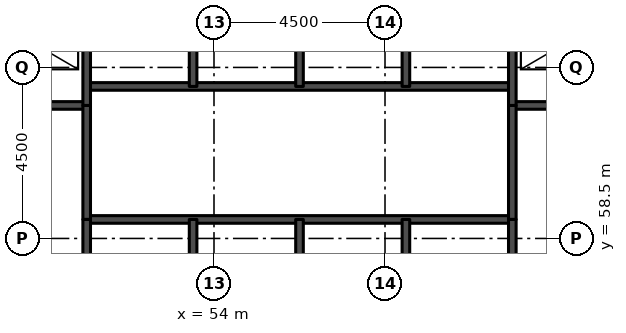
"""IFC4 building model, lengths in metres.
Left out: names, types, materials, properties, quantities, classifications, styles, units other than length and angle.
Written with IfcOpenShell. Run it as: python <this file> out.ifc"""

import sys

from ifc_helpers import new_model, si_unit, direction, frame, frame_2d, origin, place, context, subcontext, project, spatial, rectangle, extrude, element, save


model = new_model("IFC4")
c1 = context("Model", 3, precision=1e-05, world=origin(), true_north=direction((0.0, 1.0)))
c2 = subcontext(c1, "Body", "Model", "MODEL_VIEW")
j1 = project(units=[si_unit("LENGTHUNIT", "METRE"), si_unit("PLANEANGLEUNIT", "RADIAN")], contexts=[c1])
p1 = place(None, origin())
s1 = spatial("IfcSite", under=j1, at=p1, CompositionType="ELEMENT")
p2 = place(p1, origin())
s2 = spatial("IfcBuilding", under=s1, at=p2, CompositionType="ELEMENT")
p3 = place(p2, frame((0.0, 0.0, 33.0)))
s3 = spatial("IfcBuildingStorey", under=s2, at=p3, CompositionType="ELEMENT", Elevation=33.0)
p4 = place(p3, frame((50.65, 59.0, 0.0), z_axis=(0.0, 0.0, 1.0), x_axis=(1.0, 0.0, 0.0)))
e1 = element("IfcWall", 1, at=p4, inside=s3, PredefinedType="SOLIDWALL", context=c2, shape_type="SweptSolid", body=[
    extrude(rectangle(XDim=11.2, YDim=0.2, at=frame_2d((5.6, 0.0))), origin(), (0.0, 0.0, 1.0), 3.3),
])
for number, where, z_axis, x_axis in (
    (2, (45.5, 62.0, 0.0), (0.0, 0.0, 1.0), (1.0, 0.0, 0.0)),
    (3, (61.85, 62.0, 0.0), (0.0, 0.0, 1.0), (1.0, 0.0, 0.0)),
):
    element("IfcWall", number, at=place(p3, frame(where, z_axis=z_axis, x_axis=x_axis)), inside=s3, PredefinedType="SOLIDWALL", context=c2, shape_type="SweptSolid", body=[
        extrude(rectangle(XDim=5.15, YDim=0.2, at=frame_2d((2.575, 0.0))), origin(), (0.0, 0.0, 1.0), 3.08),
    ])
p5 = place(p3, frame((50.65, 62.5, 0.0), z_axis=(0.0, 0.0, 1.0), x_axis=(1.0, 0.0, 0.0)))
e4 = element("IfcWall", 4, at=p5, inside=s3, PredefinedType="SOLIDWALL", context=c2, shape_type="SweptSolid", body=[
    extrude(rectangle(XDim=11.2, YDim=0.2, at=frame_2d((5.6, 0.0))), origin(), (0.0, 0.0, 1.0), 3.3),
])
p6 = place(p3, frame((50.65, 59.0, 0.0), z_axis=(0.0, 0.0, 1.0), x_axis=(0.0, 1.0, 0.0)))
e5 = element("IfcWall", 5, at=p6, inside=s3, PredefinedType="SOLIDWALL", context=c2, shape_type="SweptSolid", body=[
    extrude(rectangle(XDim=3.0, YDim=0.2, at=frame_2d((1.5, 0.0))), origin(), (0.0, 0.0, 1.0), 3.3),
])
p7 = place(p3, frame((50.65, 56.2, 0.0), z_axis=(0.0, 0.0, 1.0), x_axis=(0.0, 1.0, 0.0)))
e6 = element("IfcWall", 6, at=p7, inside=s3, PredefinedType="SOLIDWALL", context=c2, shape_type="SweptSolid", body=[
    extrude(rectangle(XDim=2.8, YDim=0.2, at=frame_2d((1.4, 0.0))), origin(), (0.0, 0.0, 1.0), 3.08),
])
p8 = place(p3, frame((50.65, 62.0, 0.0), z_axis=(0.0, 0.0, 1.0), x_axis=(0.0, 1.0, 0.0)))
e7 = element("IfcWall", 7, at=p8, inside=s3, PredefinedType="SOLIDWALL", context=c2, shape_type="SweptSolid", body=[
    extrude(rectangle(XDim=3.3, YDim=0.2, at=frame_2d((1.65, 0.0))), origin(), (0.0, 0.0, 1.0), 3.08),
])
for number, where, z_axis, x_axis in (
    (8, (53.45, 56.2, 0.0), (0.0, 0.0, 1.0), (0.0, 1.0, 0.0)),
    (9, (53.45, 62.5, 0.0), (0.0, 0.0, 1.0), (0.0, 1.0, 0.0)),
    (10, (56.25, 56.2, 0.0), (0.0, 0.0, 1.0), (0.0, 1.0, 0.0)),
    (11, (56.25, 62.5, 0.0), (0.0, 0.0, 1.0), (0.0, 1.0, 0.0)),
    (12, (59.05, 56.2, 0.0), (0.0, 0.0, 1.0), (0.0, 1.0, 0.0)),
    (13, (59.05, 62.5, 0.0), (0.0, 0.0, 1.0), (0.0, 1.0, 0.0)),
):
    element("IfcWall", number, at=place(p3, frame(where, z_axis=z_axis, x_axis=x_axis)), inside=s3, PredefinedType="SOLIDWALL", context=c2, shape_type="SweptSolid", body=[
        extrude(rectangle(XDim=2.8, YDim=0.2, at=frame_2d((1.4, 0.0))), origin(), (0.0, 0.0, 1.0), 3.08),
    ])
p9 = place(p3, frame((61.85, 59.0, 0.0), z_axis=(0.0, 0.0, 1.0), x_axis=(0.0, 1.0, 0.0)))
e14 = element("IfcWall", 14, at=p9, inside=s3, PredefinedType="SOLIDWALL", context=c2, shape_type="SweptSolid", body=[
    extrude(rectangle(XDim=3.0, YDim=0.2, at=frame_2d((1.5, 0.0))), origin(), (0.0, 0.0, 1.0), 3.3),
])
p10 = place(p3, frame((61.85, 56.2, 0.0), z_axis=(0.0, 0.0, 1.0), x_axis=(0.0, 1.0, 0.0)))
e15 = element("IfcWall", 15, at=p10, inside=s3, PredefinedType="SOLIDWALL", context=c2, shape_type="SweptSolid", body=[
    extrude(rectangle(XDim=2.8, YDim=0.2, at=frame_2d((1.4, 0.0))), origin(), (0.0, 0.0, 1.0), 3.08),
])
p11 = place(p3, frame((61.85, 62.0, 0.0), z_axis=(0.0, 0.0, 1.0), x_axis=(0.0, 1.0, 0.0)))
e16 = element("IfcWall", 16, at=p11, inside=s3, PredefinedType="SOLIDWALL", context=c2, shape_type="SweptSolid", body=[
    extrude(rectangle(XDim=3.3, YDim=0.2, at=frame_2d((1.65, 0.0))), origin(), (0.0, 0.0, 1.0), 3.08),
])
save(model, sys.argv[1])
